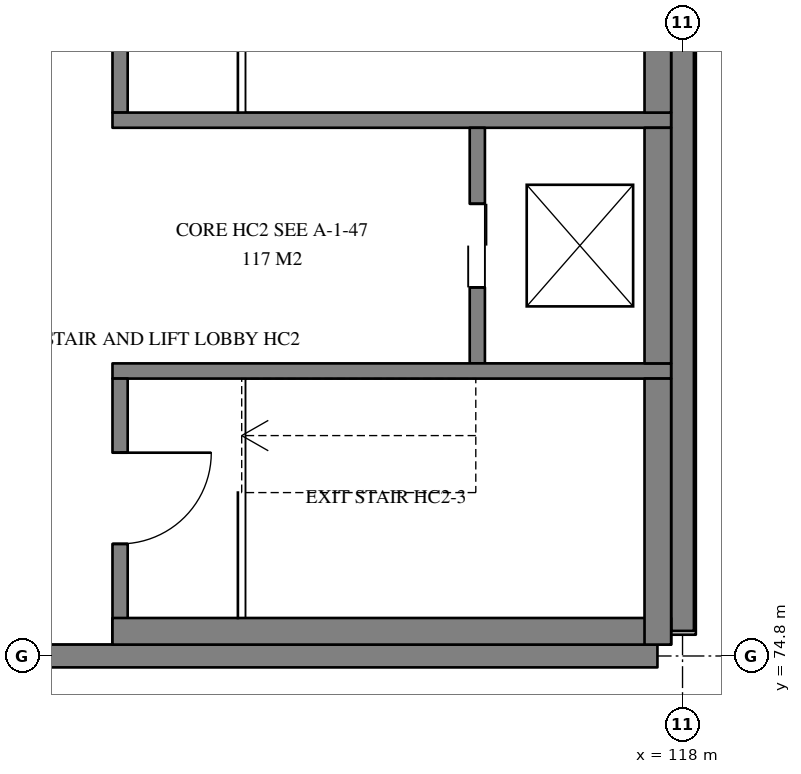
"""IFC4 building model, lengths in metres.
Left out: names, types, materials, properties, quantities, classifications, styles, units other than length and angle.
Written with IfcOpenShell. Run it as: python <this file> out.ifc"""

import sys

from ifc_helpers import new_model, si_unit, direction, frame, frame_2d, origin, origin_2d, place, context, subcontext, project, spatial, rectangle, hollow_circle, extrude, element, fill, save


model = new_model("IFC4")
c1 = context("Model", 3, precision=1e-05, world=origin(), true_north=direction((0.0, 1.0)))
c2 = subcontext(c1, "Body", "Model", "MODEL_VIEW")
j1 = project(units=[si_unit("LENGTHUNIT", "METRE"), si_unit("PLANEANGLEUNIT", "RADIAN")], contexts=[c1])
p1 = place(None, origin())
s1 = spatial("IfcSite", under=j1, at=p1, CompositionType="ELEMENT")
p2 = place(p1, origin())
s2 = spatial("IfcBuilding", under=s1, at=p2, CompositionType="ELEMENT")
p3 = place(p2, frame((0.0, 0.0, 8.7)))
s3 = spatial("IfcBuildingStorey", under=s2, at=p3, CompositionType="ELEMENT", Elevation=8.7)
p4 = place(p3, frame((118.0, 74.8, 0.0), z_axis=(0.0, 0.0, 1.0), x_axis=(1.0, 0.0, 0.0)))
e1 = element("IfcColumn", 1, at=p4, inside=s3, PredefinedType="COLUMN", context=c2, shape_type="SweptSolid", body=[
    extrude(hollow_circle(Radius=0.33, WallThickness=0.025, at=origin_2d()), origin(), (0.0, 0.0, 1.0), 2.616),
])
p5 = place(p3, frame((107.505, 74.8, 0.0), z_axis=(0.0, 0.0, 1.0), x_axis=(1.0, 0.0, 0.0)))
e2 = element("IfcWall", 2, at=p5, inside=s3, PredefinedType="SOLIDWALL", context=c2, shape_type="SweptSolid", body=[
    extrude(rectangle(XDim=10.165, YDim=0.3, at=frame_2d((5.083, 0.0))), origin(), (0.0, 0.0, 1.0), 3.9),
])
p6 = place(p3, frame((118.0, 75.13, 0.0), z_axis=(0.0, 0.0, 1.0), x_axis=(0.0, 1.0, 0.0)))
e3 = element("IfcWall", 3, at=p6, inside=s3, PredefinedType="SOLIDWALL", context=c2, shape_type="SweptSolid", body=[
    extrude(rectangle(XDim=10.14, YDim=0.3, at=frame_2d((5.07, 0.0))), origin(), (0.0, 0.0, 1.0), 3.9),
])
p7 = place(p3, frame((118.0, 75.08, 3.9), z_axis=(0.0, 0.0, 1.0), x_axis=(0.0, 1.0, 0.0)))
e4 = element("IfcWall", 4, at=p7, inside=s3, PredefinedType="SOLIDWALL", context=c2, shape_type="SweptSolid", body=[
    extrude(rectangle(XDim=10.24, YDim=0.35, at=frame_2d((5.12, 0.0))), origin(), (0.0, 0.0, 1.0), 3.821),
])
p8 = place(p3, frame((110.6, 85.45, 0.0), z_axis=(0.0, 0.0, 1.0), x_axis=(0.0, -1.0, 0.0)))
e5 = element("IfcWall", 5, at=p8, inside=s3, PredefinedType="SOLIDWALL", context=c2, shape_type="SweptSolid", body=[
    extrude(rectangle(XDim=3.5, YDim=0.2, at=frame_2d((1.75, 0.0))), origin(), (0.0, 0.0, 1.0), 3.6),
])
p9 = place(p8, frame((1.325, 0.0, 0.0)))
e6 = element("IfcOpeningElement", 6, at=p9, cuts=e5, PredefinedType="OPENING", context=c2, shape_type="SweptSolid", body=[
    extrude(rectangle(XDim=1.2, YDim=2.1, at=frame_2d((0.6, 1.05))), frame((0.0, 0.11, 0.0), z_axis=(0.0, -1.0, 0.0), x_axis=(1.0, 0.0, 0.0)), (0.0, 0.0, 1.0), 0.22),
])
p10 = place(p3, frame((110.5, 81.85, 0.0), z_axis=(0.0, 0.0, 1.0), x_axis=(1.0, 0.0, 0.0)))
e7 = element("IfcWall", 7, at=p10, inside=s3, PredefinedType="SOLIDWALL", context=c2, shape_type="SweptSolid", body=[
    extrude(rectangle(XDim=7.35, YDim=0.2, at=frame_2d((3.675, 0.0))), origin(), (0.0, 0.0, 1.0), 3.6),
])
p11 = place(p3, frame((115.3, 81.75, 0.0), z_axis=(0.0, 0.0, 1.0), x_axis=(0.0, -1.0, 0.0)))
e8 = element("IfcWall", 8, at=p11, inside=s3, PredefinedType="SOLIDWALL", context=c2, shape_type="SweptSolid", body=[
    extrude(rectangle(XDim=3.1, YDim=0.2, at=frame_2d((1.55, 0.0))), origin(), (0.0, 0.0, 1.0), 3.6),
])
p12 = place(p11, frame((1.0, 0.0, 0.0)))
e9 = element("IfcOpeningElement", 9, at=p12, cuts=e8, PredefinedType="OPENING", context=c2, shape_type="SweptSolid", body=[
    extrude(rectangle(XDim=1.1, YDim=2.1, at=frame_2d((0.55, 1.05))), frame((0.0, 0.11, 0.0), z_axis=(0.0, -1.0, 0.0), x_axis=(1.0, 0.0, 0.0)), (0.0, 0.0, 1.0), 0.22),
])
p13 = place(p3, frame((110.5, 78.55, 0.0), z_axis=(0.0, 0.0, 1.0), x_axis=(1.0, 0.0, 0.0)))
e10 = element("IfcWall", 10, at=p13, inside=s3, PredefinedType="SOLIDWALL", context=c2, shape_type="SweptSolid", body=[
    extrude(rectangle(XDim=7.35, YDim=0.2, at=frame_2d((3.675, 0.0))), origin(), (0.0, 0.0, 1.0), 3.6),
])
p14 = place(p3, frame((110.6, 78.45, 0.0), z_axis=(0.0, 0.0, 1.0), x_axis=(0.0, -1.0, 0.0)))
e11 = element("IfcWall", 11, at=p14, inside=s3, PredefinedType="SOLIDWALL", context=c2, shape_type="SweptSolid", body=[
    extrude(rectangle(XDim=3.5, YDim=0.2, at=frame_2d((1.75, 0.0))), origin(), (0.0, 0.0, 1.0), 3.6),
])
p15 = place(p14, frame((0.975, 0.0, 0.0)))
e12 = element("IfcOpeningElement", 12, at=p15, cuts=e11, PredefinedType="OPENING", context=c2, shape_type="SweptSolid", body=[
    extrude(rectangle(XDim=1.2, YDim=2.1, at=frame_2d((0.6, 1.05))), frame((0.0, 0.11, 0.0), z_axis=(0.0, -1.0, 0.0), x_axis=(1.0, 0.0, 0.0)), (0.0, 0.0, 1.0), 0.22),
])
p16 = place(p3, frame((117.675, 85.45, -0.3), z_axis=(0.0, 0.0, 1.0), x_axis=(0.0, -1.0, 0.0)))
e13 = element("IfcWall", 13, at=p16, inside=s3, PredefinedType="SOLIDWALL", context=c2, shape_type="SweptSolid", body=[
    extrude(rectangle(XDim=3.5, YDim=0.35, at=frame_2d((1.75, 0.0))), origin(), (0.0, 0.0, 1.0), 3.9),
])
p17 = place(p3, frame((110.5, 75.125, -0.3), z_axis=(0.0, 0.0, 1.0), x_axis=(1.0, 0.0, 0.0)))
e14 = element("IfcWall", 14, at=p17, inside=s3, PredefinedType="SOLIDWALL", context=c2, shape_type="SweptSolid", body=[
    extrude(rectangle(XDim=7.35, YDim=0.35, at=frame_2d((3.675, 0.0))), origin(), (0.0, 0.0, 1.0), 3.9),
])
p18 = place(p3, frame((117.675, 78.45, -0.3), z_axis=(0.0, 0.0, 1.0), x_axis=(0.0, -1.0, 0.0)))
e15 = element("IfcWall", 15, at=p18, inside=s3, PredefinedType="SOLIDWALL", context=c2, shape_type="SweptSolid", body=[
    extrude(rectangle(XDim=3.5, YDim=0.35, at=frame_2d((1.75, 0.0))), origin(), (0.0, 0.0, 1.0), 3.9),
])
p19 = place(p3, frame((117.675, 81.75, -0.3), z_axis=(0.0, 0.0, 1.0), x_axis=(0.0, -1.0, 0.0)))
e16 = element("IfcWall", 16, at=p19, inside=s3, PredefinedType="SOLIDWALL", context=c2, shape_type="SweptSolid", body=[
    extrude(rectangle(XDim=3.1, YDim=0.35, at=frame_2d((1.55, 0.0))), origin(), (0.0, 0.0, 1.0), 3.9),
])
p20 = place(p2, frame((0.0, 0.0, 4.8)))
s4 = spatial("IfcBuildingStorey", under=s2, at=p20, CompositionType="ELEMENT", Elevation=4.8)
p21 = place(p20, frame((110.875, 64.0, 0.0), z_axis=(0.0, 0.0, 1.0), x_axis=(0.0, 1.0, 0.0)))
e17 = element("IfcWall", 17, at=p21, inside=s4, PredefinedType="PARTITIONING", context=c2, shape_type="SweptSolid", body=[
    extrude(rectangle(XDim=10.62, YDim=0.15, at=frame_2d((5.31, 0.0))), origin(), (0.0, 0.0, 1.0), 7.574),
])
p22 = place(p21, frame((4.81, 0.0, 0.0)))
e18 = element("IfcOpeningElement", 18, at=p22, cuts=e17, PredefinedType="OPENING", context=c2, shape_type="SweptSolid", body=[
    extrude(rectangle(XDim=1.0, YDim=2.1, at=frame_2d((0.5, 1.05))), frame((0.0, 0.085, 0.0), z_axis=(0.0, -1.0, 0.0), x_axis=(1.0, 0.0, 0.0)), (0.0, 0.0, 1.0), 0.17),
])
p23 = place(p12, frame((1.1, 0.0, 0.0), z_axis=(0.0, 0.0, 1.0), x_axis=(-1.0, 0.0, 0.0)))
e19 = element("IfcDoor", 19, at=p23, inside=s3, OperationType="DOUBLE_DOOR_SLIDING", PredefinedType="DOOR", context=c2, shape_type="SweptSolid", body=[
    extrude(rectangle(XDim=1.1, YDim=2.1, at=frame_2d((0.55, 1.05))), frame((0.0, 0.025, 0.0), z_axis=(0.0, -1.0, 0.0), x_axis=(1.0, 0.0, 0.0)), (0.0, 0.0, 1.0), 0.05),
])
fill(e9, e19)
p24 = place(p15, frame((1.2, 0.0, 0.0), z_axis=(0.0, 0.0, 1.0), x_axis=(-1.0, 0.0, 0.0)))
e20 = element("IfcDoor", 20, at=p24, inside=s3, OperationType="SINGLE_SWING_RIGHT", PredefinedType="DOOR", context=c2, shape_type="SweptSolid", body=[
    extrude(rectangle(XDim=1.2, YDim=2.1, at=frame_2d((0.6, 1.05))), frame((0.0, 0.025, 0.0), z_axis=(0.0, -1.0, 0.0), x_axis=(1.0, 0.0, 0.0)), (0.0, 0.0, 1.0), 0.05),
])
fill(e12, e20)
save(model, sys.argv[1])
